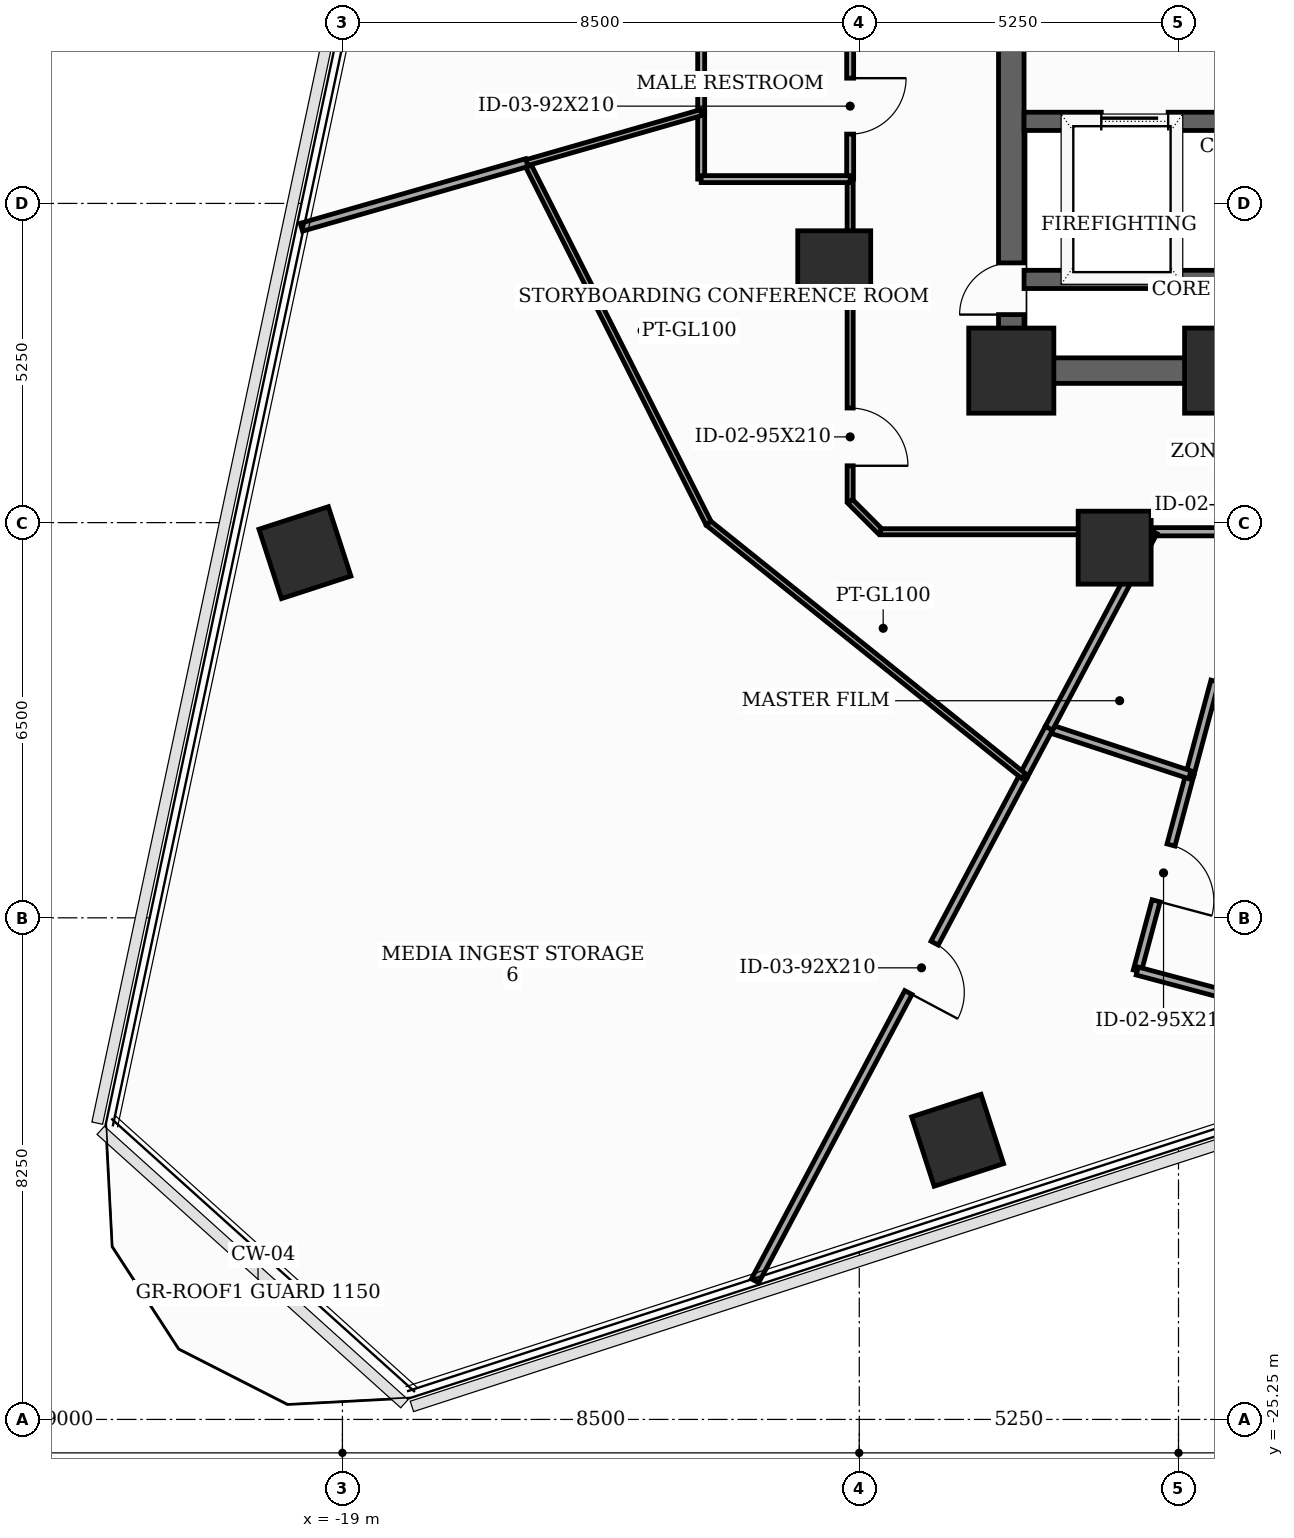
"""IFC4 building model, lengths in metres.
Left out: names, types, materials, properties, quantities, classifications, styles, units other than length and angle.
Written with IfcOpenShell. Run it as: python <this file> out.ifc"""

import sys

from ifc_helpers import new_model, si_unit, direction, frame, frame_2d, origin, origin_2d, place, context, subcontext, project, spatial, rectangle, extrude, element, fill, save


model = new_model("IFC4")
c1 = context("Model", 3, precision=1e-05, world=origin(), true_north=direction((0.0, 1.0)))
c2 = subcontext(c1, "Body", "Model", "MODEL_VIEW")
j1 = project(units=[si_unit("LENGTHUNIT", "METRE"), si_unit("PLANEANGLEUNIT", "RADIAN")], contexts=[c1])
p1 = place(None, origin())
s1 = spatial("IfcSite", under=j1, at=p1, CompositionType="ELEMENT")
p2 = place(p1, origin())
s2 = spatial("IfcBuilding", under=s1, at=p2, CompositionType="ELEMENT")
p3 = place(p2, frame((0.0, 0.0, 94.0)))
s3 = spatial("IfcBuildingStorey", under=s2, at=p3, CompositionType="ELEMENT", Elevation=94.0)
for number, where, z_axis, x_axis in (
    (1, (-8.0, -8.0, 0.0), (0.0, 0.0, 1.0), (1.0, 0.0, 0.0)),
    (2, (-4.45, -8.0, 0.0), (0.0, 0.0, 1.0), (1.0, 0.0, 0.0)),
):
    element("IfcColumn", number, at=place(p3, frame(where, z_axis=z_axis, x_axis=x_axis)), inside=s3, PredefinedType="COLUMN", context=c2, shape_type="SweptSolid", body=[
        extrude(rectangle(XDim=1.4, YDim=1.4, at=origin_2d()), origin(), (0.0, 0.0, 1.0), 3.7),
    ])
for number, where, z_axis, x_axis in (
    (3, (-10.912, -6.3, 0.0), (0.0, 0.0, 1.0), (1.0, 0.0, 0.0)),
    (4, (-6.3, -10.912, 0.0), (0.0, 0.0, 1.0), (1.0, 0.0, 0.0)),
    (5, (-8.883, -20.658, 0.0), (0.0, 0.0, 1.0), (0.951, 0.309, 0.0)),
    (6, (-19.616, -10.994, 0.0), (0.0, 0.0, 1.0), (0.951, 0.309, 0.0)),
):
    element("IfcColumn", number, at=place(p3, frame(where, z_axis=z_axis, x_axis=x_axis)), inside=s3, PredefinedType="COLUMN", context=c2, shape_type="SweptSolid", body=[
        extrude(rectangle(XDim=1.2, YDim=1.2, at=origin_2d()), origin(), (0.0, 0.0, 1.0), 3.7),
    ])
p4 = place(p3, frame((-8.0, -8.0, 0.0), z_axis=(0.0, 0.0, 1.0), x_axis=(0.0, 1.0, 0.0)))
e7 = element("IfcWall", 7, at=p4, inside=s3, PredefinedType="SHEAR", context=c2, shape_type="SweptSolid", body=[
    extrude(rectangle(XDim=16.0, YDim=0.42, at=frame_2d((8.0, 0.0))), origin(), (0.0, 0.0, 1.0), 3.5),
])
p5 = place(p4, frame((0.922, 0.0, 0.0)))
e8 = element("IfcOpeningElement", 8, at=p5, cuts=e7, PredefinedType="OPENING", context=c2, shape_type="SweptSolid", body=[
    extrude(rectangle(XDim=0.85, YDim=2.02, at=frame_2d((0.425, 1.01))), frame((0.0, 0.22, 0.0), z_axis=(0.0, -1.0, 0.0), x_axis=(1.0, 0.0, 0.0)), (0.0, 0.0, 1.0), 0.44),
])
p6 = place(p4, frame((5.35, 0.0, 0.0)))
e9 = element("IfcOpeningElement", 9, at=p6, cuts=e7, PredefinedType="OPENING", context=c2, shape_type="SweptSolid", body=[
    extrude(rectangle(XDim=1.05, YDim=2.15, at=frame_2d((0.525, 1.075))), frame((0.0, 0.22, 0.0), z_axis=(0.0, -1.0, 0.0), x_axis=(1.0, 0.0, 0.0)), (0.0, 0.0, 1.0), 0.44),
])
p7 = place(p3, frame((-8.0, -8.0, 0.0), z_axis=(0.0, 0.0, 1.0), x_axis=(1.0, 0.0, 0.0)))
e10 = element("IfcWall", 10, at=p7, inside=s3, PredefinedType="SHEAR", context=c2, shape_type="SweptSolid", body=[
    extrude(rectangle(XDim=16.0, YDim=0.42, at=frame_2d((8.0, 0.0))), origin(), (0.0, 0.0, 1.0), 3.5),
])
p8 = place(p7, frame((7.52, 0.0, 0.0)))
e11 = element("IfcOpeningElement", 11, at=p8, cuts=e10, PredefinedType="OPENING", context=c2, shape_type="SweptSolid", body=[
    extrude(rectangle(XDim=0.95, YDim=2.1, at=frame_2d((0.475, 1.05))), frame((0.0, 0.22, 0.0), z_axis=(0.0, -1.0, 0.0), x_axis=(1.0, 0.0, 0.0)), (0.0, 0.0, 1.0), 0.44),
])
p9 = place(p3, frame((-7.79, -3.9, 0.0), z_axis=(0.0, 0.0, 1.0), x_axis=(1.0, 0.0, 0.0)))
e12 = element("IfcWall", 12, at=p9, inside=s3, PredefinedType="SHEAR", context=c2, shape_type="SweptSolid", body=[
    extrude(rectangle(XDim=3.34, YDim=0.3, at=frame_2d((1.67, 0.0))), origin(), (0.0, 0.0, 1.0), 3.5),
])
p10 = place(p9, frame((1.27, 0.0, 0.0)))
e13 = element("IfcOpeningElement", 13, at=p10, cuts=e12, PredefinedType="OPENING", context=c2, shape_type="SweptSolid", body=[
    extrude(rectangle(XDim=1.1, YDim=2.1, at=frame_2d((0.55, 1.05))), frame((0.0, 0.16, 0.0), z_axis=(0.0, -1.0, 0.0), x_axis=(1.0, 0.0, 0.0)), (0.0, 0.0, 1.0), 0.32),
])
p11 = place(p3, frame((-7.79, -6.5, 0.0), z_axis=(0.0, 0.0, 1.0), x_axis=(1.0, 0.0, 0.0)))
e14 = element("IfcWall", 14, at=p11, inside=s3, PredefinedType="SHEAR", context=c2, shape_type="SweptSolid", body=[
    extrude(rectangle(XDim=3.34, YDim=0.3, at=frame_2d((1.67, 0.0))), origin(), (0.0, 0.0, 1.0), 3.5),
])
p12 = place(p3, frame((-5.663, -10.65, 0.0), z_axis=(0.0, 0.0, 1.0), x_axis=(1.0, 0.0, 0.0)))
e15 = element("IfcWall", 15, at=p12, inside=s3, PredefinedType="PARTITIONING", context=c2, shape_type="SweptSolid", body=[
    extrude(rectangle(XDim=1.671, YDim=0.135, at=frame_2d((0.835, 0.0))), origin(), (0.0, 0.0, 1.0), 3.5),
])
p13 = place(p3, frame((-3.992, -10.65, 0.0), z_axis=(0.0, 0.0, 1.0), x_axis=(-0.259046685972, -0.96586480135, 0.0)))
e16 = element("IfcWall", 16, at=p13, inside=s3, PredefinedType="PARTITIONING", context=c2, shape_type="SweptSolid", body=[
    extrude(rectangle(XDim=4.138, YDim=0.135, at=frame_2d((2.069, 0.0))), origin(), (0.0, 0.0, 1.0), 2.785),
])
p14 = place(p13, frame((1.594, 0.0, 0.0)))
e17 = element("IfcOpeningElement", 17, at=p14, cuts=e16, PredefinedType="OPENING", context=c2, shape_type="SweptSolid", body=[
    extrude(rectangle(XDim=0.95, YDim=2.1, at=frame_2d((0.475, 1.05))), frame((0.0, 0.077, 0.0), z_axis=(0.0, -1.0, 0.0), x_axis=(1.0, 0.0, 0.0)), (0.0, 0.0, 1.0), 0.155),
])
p15 = place(p3, frame((-5.064, -14.647, 0.0), z_axis=(0.0, 0.0, 1.0), x_axis=(-0.258558355083, -0.965995640268, 0.0)))
e18 = element("IfcWall", 18, at=p15, inside=s3, PredefinedType="PARTITIONING", context=c2, shape_type="SweptSolid", body=[
    extrude(rectangle(XDim=3.342, YDim=0.135, at=frame_2d((1.671, 0.0))), origin(), (0.0, 0.0, 1.0), 3.125),
])
p16 = place(p15, frame((1.196, 0.0, 0.0)))
e19 = element("IfcOpeningElement", 19, at=p16, cuts=e18, PredefinedType="OPENING", context=c2, shape_type="SweptSolid", body=[
    extrude(rectangle(XDim=0.95, YDim=2.1, at=frame_2d((0.475, 1.05))), frame((0.0, 0.077, 0.0), z_axis=(0.0, -1.0, 0.0), x_axis=(1.0, 0.0, 0.0)), (0.0, 0.0, 1.0), 0.155),
])
p17 = place(p3, frame((-5.928, -17.875, 0.0), z_axis=(0.0, 0.0, 1.0), x_axis=(0.965959937537, -0.258691706618, 0.0)))
e20 = element("IfcWall", 20, at=p17, inside=s3, PredefinedType="PARTITIONING", context=c2, shape_type="SweptSolid", body=[
    extrude(rectangle(XDim=2.2, YDim=0.135, at=frame_2d((1.1, 0.0))), origin(), (0.0, 0.0, 1.0), 3.5),
])
p18 = place(p3, frame((-10.65, -2.45, 0.0), z_axis=(0.0, 0.0, 1.0), x_axis=(0.0, -1.0, 0.0)))
e21 = element("IfcWall", 21, at=p18, inside=s3, PredefinedType="PARTITIONING", context=c2, shape_type="SweptSolid", body=[
    extrude(rectangle(XDim=2.4, YDim=0.115, at=frame_2d((1.2, 0.0))), origin(), (0.0, 0.0, 1.0), 3.5),
])
p19 = place(p18, frame((0.74, 0.0, 0.0)))
e22 = element("IfcOpeningElement", 22, at=p19, cuts=e21, PredefinedType="OPENING", context=c2, shape_type="SweptSolid", body=[
    extrude(rectangle(XDim=0.92, YDim=2.1, at=frame_2d((0.46, 1.05))), frame((0.0, 0.067, 0.0), z_axis=(0.0, -1.0, 0.0), x_axis=(1.0, 0.0, 0.0)), (0.0, 0.0, 1.0), 0.135),
])
p20 = place(p3, frame((-10.65, -4.85, 0.0), z_axis=(0.0, 0.0, 1.0), x_axis=(0.0, -1.0, 0.0)))
e23 = element("IfcWall", 23, at=p20, inside=s3, PredefinedType="MOVABLE", context=c2, shape_type="SweptSolid", body=[
    extrude(rectangle(XDim=5.3, YDim=0.1, at=frame_2d((2.65, 0.0))), origin(), (0.0, 0.0, 1.0), 2.785),
])
p21 = place(p20, frame((3.765, 0.0, 0.0)))
e24 = element("IfcOpeningElement", 24, at=p21, cuts=e23, PredefinedType="OPENING", context=c2, shape_type="SweptSolid", body=[
    extrude(rectangle(XDim=0.95, YDim=2.1, at=frame_2d((0.475, 1.05))), frame((0.0, 0.06, 0.0), z_axis=(0.0, -1.0, 0.0), x_axis=(1.0, 0.0, 0.0)), (0.0, 0.0, 1.0), 0.12),
])
p22 = place(p3, frame((-10.65, -10.15, 0.0), z_axis=(0.0, 0.0, 1.0), x_axis=(0.707106781187, -0.707106781187, 0.0)))
e25 = element("IfcWall", 25, at=p22, inside=s3, PredefinedType="MOVABLE", context=c2, shape_type="SweptSolid", body=[
    extrude(rectangle(XDim=0.707, YDim=0.1, at=frame_2d((0.354, 0.0))), origin(), (0.0, 0.0, 1.0), 3.5),
])
p23 = place(p3, frame((-10.15, -10.65, 0.0), z_axis=(0.0, 0.0, 1.0), x_axis=(1.0, 0.0, 0.0)))
e26 = element("IfcWall", 26, at=p23, inside=s3, PredefinedType="MOVABLE", context=c2, shape_type="SweptSolid", body=[
    extrude(rectangle(XDim=4.487, YDim=0.1, at=frame_2d((2.243, 0.0))), origin(), (0.0, 0.0, 1.0), 2.785),
])
p24 = place(p3, frame((-7.382, -13.883, 0.0), z_axis=(0.0, 0.0, 1.0), x_axis=(0.949758055829, -0.312985040199, 0.0)))
e27 = element("IfcWall", 27, at=p24, inside=s3, PredefinedType="PARTITIONING", context=c2, shape_type="SweptSolid", body=[
    extrude(rectangle(XDim=2.441, YDim=0.135, at=frame_2d((1.22, 0.0))), origin(), (0.0, 0.0, 1.0), 2.785),
])
p25 = place(p3, frame((-5.663, -10.65, 0.0), z_axis=(0.0, 0.0, 1.0), x_axis=(-0.469449315633, -0.882959421521, 0.0)))
e28 = element("IfcWall", 28, at=p25, inside=s3, PredefinedType="PARTITIONING", context=c2, shape_type="SweptSolid", body=[
    extrude(rectangle(XDim=3.662, YDim=0.135, at=frame_2d((1.831, 0.0))), origin(), (0.0, 0.0, 1.0), 2.785),
])
p26 = place(p3, frame((-7.382, -13.883, 0.0), z_axis=(0.0, 0.0, 1.0), x_axis=(-0.469617532863, -0.882869963714, 0.0)))
e29 = element("IfcWall", 29, at=p26, inside=s3, PredefinedType="PARTITIONING", context=c2, shape_type="SweptSolid", body=[
    extrude(rectangle(XDim=0.888, YDim=0.135, at=frame_2d((0.444, 0.0))), origin(), (0.0, 0.0, 1.0), 2.785),
])
p27 = place(p3, frame((-7.799, -14.667, 0.0), z_axis=(0.0, 0.0, 1.0), x_axis=(-0.469441180524, -0.882963746723, 0.0)))
e30 = element("IfcWall", 30, at=p27, inside=s3, PredefinedType="PARTITIONING", context=c2, shape_type="SweptSolid", body=[
    extrude(rectangle(XDim=9.404, YDim=0.135, at=frame_2d((4.702, 0.0))), origin(), (0.0, 0.0, 1.0), 2.935),
])
p28 = place(p27, frame((3.114, 0.0, 0.0)))
e31 = element("IfcOpeningElement", 31, at=p28, cuts=e30, PredefinedType="OPENING", context=c2, shape_type="SweptSolid", body=[
    extrude(rectangle(XDim=0.92, YDim=2.1, at=frame_2d((0.46, 1.05))), frame((0.0, 0.077, 0.0), z_axis=(0.0, -1.0, 0.0), x_axis=(1.0, 0.0, 0.0)), (0.0, 0.0, 1.0), 0.155),
])
p29 = place(p3, frame((-13.1, -3.756, 0.0), z_axis=(0.0, 0.0, 1.0), x_axis=(0.0, -1.0, 0.0)))
e32 = element("IfcWall", 32, at=p29, inside=s3, PredefinedType="PARTITIONING", context=c2, shape_type="SweptSolid", body=[
    extrude(rectangle(XDim=1.094, YDim=0.115, at=frame_2d((0.547, 0.0))), origin(), (0.0, 0.0, 1.0), 3.5),
])
p30 = place(p3, frame((-13.1, -4.85, 0.0), z_axis=(0.0, 0.0, 1.0), x_axis=(1.0, 0.0, 0.0)))
e33 = element("IfcWall", 33, at=p30, inside=s3, PredefinedType="PARTITIONING", context=c2, shape_type="SweptSolid", body=[
    extrude(rectangle(XDim=2.45, YDim=0.115, at=frame_2d((1.225, 0.0))), origin(), (0.0, 0.0, 1.0), 2.785),
])
p31 = place(p3, frame((-13.1, -2.45, 0.0), z_axis=(0.0, 0.0, 1.0), x_axis=(0.0, -1.0, 0.0)))
e34 = element("IfcWall", 34, at=p31, inside=s3, PredefinedType="PARTITIONING", context=c2, shape_type="SweptSolid", body=[
    extrude(rectangle(XDim=1.306, YDim=0.115, at=frame_2d((0.653, 0.0))), origin(), (0.0, 0.0, 1.0), 3.5),
])
p32 = place(p3, frame((-15.968, -4.579, 0.0), z_axis=(0.0, 0.0, 1.0), x_axis=(0.450166439867, -0.892944665933, 0.0)))
e35 = element("IfcWall", 35, at=p32, inside=s3, PredefinedType="MOVABLE", context=c2, shape_type="SweptSolid", body=[
    extrude(rectangle(XDim=6.642, YDim=0.1, at=frame_2d((3.321, 0.0))), origin(), (0.0, 0.0, 1.0), 2.785),
])
p33 = place(p3, frame((-12.978, -10.51, 0.0), z_axis=(0.0, 0.0, 1.0), x_axis=(0.779852762203, -0.625962993543, 0.0)))
e36 = element("IfcWall", 36, at=p33, inside=s3, PredefinedType="MOVABLE", context=c2, shape_type="SweptSolid", body=[
    extrude(rectangle(XDim=6.641, YDim=0.1, at=frame_2d((3.32, 0.0))), origin(), (0.0, 0.0, 1.0), 3.5),
])
p34 = place(p3, frame((-13.1, -3.756, 0.0), z_axis=(0.0, 0.0, 1.0), x_axis=(-0.961205264208, -0.275834080671, 0.0)))
e37 = element("IfcWall", 37, at=p34, inside=s3, PredefinedType="MOVABLE", context=c2, shape_type="SweptSolid", body=[
    extrude(rectangle(XDim=2.984, YDim=0.1, at=frame_2d((1.492, 0.0))), origin(), (0.0, 0.0, 1.0), 3.125),
])
p35 = place(p3, frame((-15.968, -4.579, 0.0), z_axis=(0.0, 0.0, 1.0), x_axis=(-0.961294264275, -0.275523751194, 0.0)))
e38 = element("IfcWall", 38, at=p35, inside=s3, PredefinedType="PARTITIONING", context=c2, shape_type="SweptSolid", body=[
    extrude(rectangle(XDim=3.856, YDim=0.135, at=frame_2d((1.928, 0.0))), origin(), (0.0, 0.0, 1.0), 2.935),
])
p36 = place(p5, origin())
e39 = element("IfcDoor", 39, at=p36, inside=s3, OperationType="SINGLE_SWING_LEFT", PredefinedType="TRAPDOOR", context=c2, shape_type="SweptSolid", body=[
    extrude(rectangle(XDim=0.85, YDim=2.02, at=frame_2d((0.425, 1.01))), frame((0.0, 0.025, 0.0), z_axis=(0.0, -1.0, 0.0), x_axis=(1.0, 0.0, 0.0)), (0.0, 0.0, 1.0), 0.05),
])
fill(e8, e39)
p37 = place(p10, origin())
e40 = element("IfcDoor", 40, at=p37, inside=s3, OperationType="SLIDING_TO_LEFT", PredefinedType="DOOR", context=c2, shape_type="SweptSolid", body=[
    extrude(rectangle(XDim=1.1, YDim=2.1, at=frame_2d((0.55, 1.05))), frame((0.0, 0.025, 0.0), z_axis=(0.0, -1.0, 0.0), x_axis=(1.0, 0.0, 0.0)), (0.0, 0.0, 1.0), 0.05),
])
fill(e13, e40)
p38 = place(p14, origin())
e41 = element("IfcDoor", 41, at=p38, inside=s3, OperationType="SINGLE_SWING_LEFT", PredefinedType="DOOR", context=c2, shape_type="SweptSolid", body=[
    extrude(rectangle(XDim=0.95, YDim=2.1, at=frame_2d((0.475, 1.05))), frame((0.0, 0.025, 0.0), z_axis=(0.0, -1.0, 0.0), x_axis=(1.0, 0.0, 0.0)), (0.0, 0.0, 1.0), 0.05),
])
fill(e17, e41)
p39 = place(p16, origin())
e42 = element("IfcDoor", 42, at=p39, inside=s3, OperationType="SINGLE_SWING_RIGHT", PredefinedType="DOOR", context=c2, shape_type="SweptSolid", body=[
    extrude(rectangle(XDim=0.95, YDim=2.1, at=frame_2d((0.475, 1.05))), frame((0.0, 0.025, 0.0), z_axis=(0.0, -1.0, 0.0), x_axis=(1.0, 0.0, 0.0)), (0.0, 0.0, 1.0), 0.05),
])
fill(e19, e42)
p40 = place(p19, origin())
e43 = element("IfcDoor", 43, at=p40, inside=s3, OperationType="SINGLE_SWING_LEFT", PredefinedType="DOOR", context=c2, shape_type="SweptSolid", body=[
    extrude(rectangle(XDim=0.92, YDim=2.1, at=frame_2d((0.46, 1.05))), frame((0.0, 0.025, 0.0), z_axis=(0.0, -1.0, 0.0), x_axis=(1.0, 0.0, 0.0)), (0.0, 0.0, 1.0), 0.05),
])
fill(e22, e43)
p41 = place(p21, origin())
e44 = element("IfcDoor", 44, at=p41, inside=s3, OperationType="SINGLE_SWING_RIGHT", PredefinedType="DOOR", context=c2, shape_type="SweptSolid", body=[
    extrude(rectangle(XDim=0.95, YDim=2.1, at=frame_2d((0.475, 1.05))), frame((0.0, 0.025, 0.0), z_axis=(0.0, -1.0, 0.0), x_axis=(1.0, 0.0, 0.0)), (0.0, 0.0, 1.0), 0.05),
])
fill(e24, e44)
p42 = place(p28, origin())
e45 = element("IfcDoor", 45, at=p42, inside=s3, OperationType="SINGLE_SWING_RIGHT", PredefinedType="DOOR", context=c2, shape_type="SweptSolid", body=[
    extrude(rectangle(XDim=0.92, YDim=2.1, at=frame_2d((0.46, 1.05))), frame((0.0, 0.025, 0.0), z_axis=(0.0, -1.0, 0.0), x_axis=(1.0, 0.0, 0.0)), (0.0, 0.0, 1.0), 0.05),
])
fill(e31, e45)
save(model, sys.argv[1])
